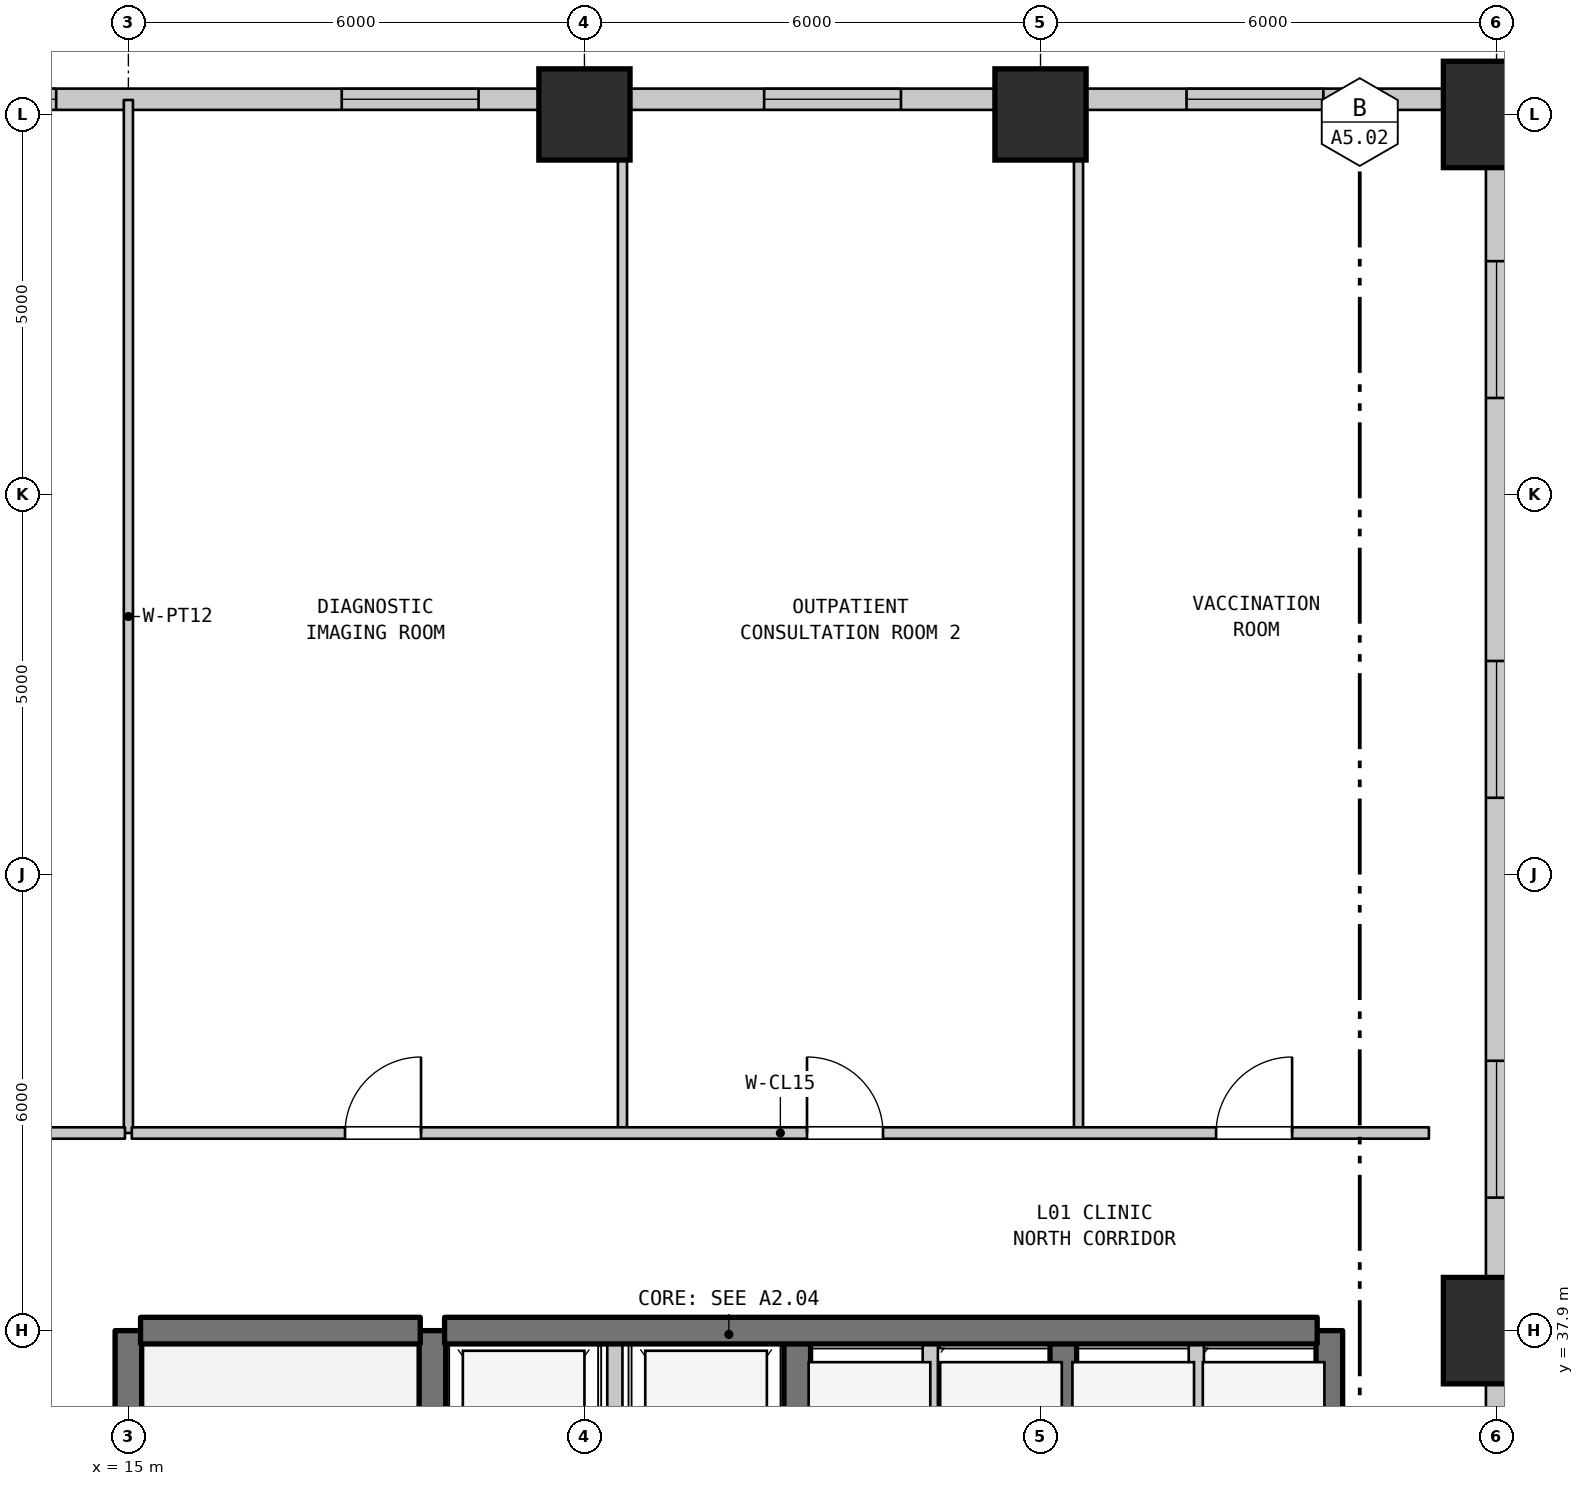
"""IFC4 building model, lengths in metres.
Left out: names, types, materials, properties, quantities, classifications, styles, units other than length and angle.
Written with IfcOpenShell. Run it as: python <this file> out.ifc"""

import sys

from ifc_helpers import new_model, si_unit, direction, frame, frame_2d, origin, origin_2d, place, context, subcontext, project, spatial, rectangle, extrude, element, fill, save


model = new_model("IFC4")
c1 = context("Model", 3, precision=1e-05, world=origin(), true_north=direction((0.0, 1.0)))
c2 = subcontext(c1, "Body", "Model", "MODEL_VIEW")
j1 = project(units=[si_unit("LENGTHUNIT", "METRE"), si_unit("PLANEANGLEUNIT", "RADIAN")], contexts=[c1])
p1 = place(None, origin())
s1 = spatial("IfcSite", under=j1, at=p1, CompositionType="ELEMENT")
p2 = place(p1, origin())
s2 = spatial("IfcBuilding", under=s1, at=p2, CompositionType="ELEMENT")
p3 = place(p2, frame((0.0, 0.0, 6.5)))
s3 = spatial("IfcBuildingStorey", under=s2, at=p3, CompositionType="ELEMENT", Elevation=6.5)
for number, where, z_axis, x_axis in (
    (1, (21.0, 53.9, 0.0), (0.0, 0.0, 1.0), (1.0, 0.0, 0.0)),
    (2, (27.0, 53.9, 0.0), (0.0, 0.0, 1.0), (1.0, 0.0, 0.0)),
):
    element("IfcColumn", number, at=place(p3, frame(where, z_axis=z_axis, x_axis=x_axis)), inside=s3, PredefinedType="PILASTER", context=c2, shape_type="SweptSolid", body=[
        extrude(rectangle(XDim=1.2, YDim=1.2, at=origin_2d()), origin(), (0.0, 0.0, 1.0), 6.5),
    ])
for number, where, z_axis, x_axis in (
    (3, (33.0, 37.9, 0.0), (0.0, 0.0, 1.0), (1.0, 0.0, 0.0)),
    (4, (33.0, 53.9, 0.0), (0.0, 0.0, 1.0), (1.0, 0.0, 0.0)),
):
    element("IfcColumn", number, at=place(p3, frame(where, z_axis=z_axis, x_axis=x_axis)), inside=s3, PredefinedType="PILASTER", context=c2, shape_type="SweptSolid", body=[
        extrude(rectangle(XDim=1.4, YDim=1.4, at=origin_2d()), origin(), (0.0, 0.0, 1.0), 6.5),
    ])
p4 = place(p3, frame((4.414, 54.1, 0.0), z_axis=(0.0, 0.0, 1.0), x_axis=(1.0, 0.0, 0.0)))
e5 = element("IfcWall", 5, at=p4, inside=s3, PredefinedType="STANDARD", context=c2, shape_type="SweptSolid", body=[
    extrude(rectangle(XDim=28.586, YDim=0.28, at=frame_2d((14.293, 0.0))), origin(), (0.0, 0.0, 1.0), 6.17),
])
p5 = place(p4, frame((2.279, 0.0, 0.95)))
e6 = element("IfcOpeningElement", 6, at=p5, cuts=e5, PredefinedType="OPENING", context=c2, shape_type="SweptSolid", body=[
    extrude(rectangle(XDim=1.8, YDim=1.8, at=frame_2d((0.9, 0.9))), frame((0.0, 0.15, 0.0), z_axis=(0.0, -1.0, 0.0), x_axis=(1.0, 0.0, 0.0)), (0.0, 0.0, 1.0), 0.3),
])
p6 = place(p4, frame((7.836, 0.0, 0.95)))
e7 = element("IfcOpeningElement", 7, at=p6, cuts=e5, PredefinedType="OPENING", context=c2, shape_type="SweptSolid", body=[
    extrude(rectangle(XDim=1.8, YDim=1.8, at=frame_2d((0.9, 0.9))), frame((0.0, 0.15, 0.0), z_axis=(0.0, -1.0, 0.0), x_axis=(1.0, 0.0, 0.0)), (0.0, 0.0, 1.0), 0.3),
])
p7 = place(p4, frame((13.393, 0.0, 0.95)))
e8 = element("IfcOpeningElement", 8, at=p7, cuts=e5, PredefinedType="OPENING", context=c2, shape_type="SweptSolid", body=[
    extrude(rectangle(XDim=1.8, YDim=1.8, at=frame_2d((0.9, 0.9))), frame((0.0, 0.15, 0.0), z_axis=(0.0, -1.0, 0.0), x_axis=(1.0, 0.0, 0.0)), (0.0, 0.0, 1.0), 0.3),
])
p8 = place(p4, frame((18.95, 0.0, 0.95)))
e9 = element("IfcOpeningElement", 9, at=p8, cuts=e5, PredefinedType="OPENING", context=c2, shape_type="SweptSolid", body=[
    extrude(rectangle(XDim=1.8, YDim=1.8, at=frame_2d((0.9, 0.9))), frame((0.0, 0.15, 0.0), z_axis=(0.0, -1.0, 0.0), x_axis=(1.0, 0.0, 0.0)), (0.0, 0.0, 1.0), 0.3),
])
p9 = place(p4, frame((24.507, 0.0, 0.95)))
e10 = element("IfcOpeningElement", 10, at=p9, cuts=e5, PredefinedType="OPENING", context=c2, shape_type="SweptSolid", body=[
    extrude(rectangle(XDim=1.8, YDim=1.8, at=frame_2d((0.9, 0.9))), frame((0.0, 0.15, 0.0), z_axis=(0.0, -1.0, 0.0), x_axis=(1.0, 0.0, 0.0)), (0.0, 0.0, 1.0), 0.3),
])
p10 = place(p3, frame((33.0, 54.1, 0.0), z_axis=(0.0, 0.0, 1.0), x_axis=(0.0, -1.0, 0.0)))
e11 = element("IfcWall", 11, at=p10, inside=s3, PredefinedType="STANDARD", context=c2, shape_type="SweptSolid", body=[
    extrude(rectangle(XDim=26.2, YDim=0.28, at=frame_2d((13.1, 0.0))), origin(), (0.0, 0.0, 1.0), 5.57),
])
p11 = place(p10, frame((2.13, 0.0, 0.95)))
e12 = element("IfcOpeningElement", 12, at=p11, cuts=e11, PredefinedType="OPENING", context=c2, shape_type="SweptSolid", body=[
    extrude(rectangle(XDim=1.8, YDim=1.8, at=frame_2d((0.9, 0.9))), frame((0.0, 0.15, 0.0), z_axis=(0.0, -1.0, 0.0), x_axis=(1.0, 0.0, 0.0)), (0.0, 0.0, 1.0), 0.3),
])
p12 = place(p10, frame((7.39, 0.0, 0.95)))
e13 = element("IfcOpeningElement", 13, at=p12, cuts=e11, PredefinedType="OPENING", context=c2, shape_type="SweptSolid", body=[
    extrude(rectangle(XDim=1.8, YDim=1.8, at=frame_2d((0.9, 0.9))), frame((0.0, 0.15, 0.0), z_axis=(0.0, -1.0, 0.0), x_axis=(1.0, 0.0, 0.0)), (0.0, 0.0, 1.0), 0.3),
])
p13 = place(p10, frame((12.65, 0.0, 0.95)))
e14 = element("IfcOpeningElement", 14, at=p13, cuts=e11, PredefinedType="OPENING", context=c2, shape_type="SweptSolid", body=[
    extrude(rectangle(XDim=1.8, YDim=1.8, at=frame_2d((0.9, 0.9))), frame((0.0, 0.15, 0.0), z_axis=(0.0, -1.0, 0.0), x_axis=(1.0, 0.0, 0.0)), (0.0, 0.0, 1.0), 0.3),
])
p14 = place(p10, frame((17.91, 0.0, 0.95)))
e15 = element("IfcOpeningElement", 15, at=p14, cuts=e11, PredefinedType="OPENING", context=c2, shape_type="SweptSolid", body=[
    extrude(rectangle(XDim=1.8, YDim=1.8, at=frame_2d((0.9, 0.9))), frame((0.0, 0.15, 0.0), z_axis=(0.0, -1.0, 0.0), x_axis=(1.0, 0.0, 0.0)), (0.0, 0.0, 1.0), 0.3),
])
p15 = place(p10, frame((23.17, 0.0, 0.95)))
e16 = element("IfcOpeningElement", 16, at=p15, cuts=e11, PredefinedType="OPENING", context=c2, shape_type="SweptSolid", body=[
    extrude(rectangle(XDim=1.8, YDim=1.8, at=frame_2d((0.9, 0.9))), frame((0.0, 0.15, 0.0), z_axis=(0.0, -1.0, 0.0), x_axis=(1.0, 0.0, 0.0)), (0.0, 0.0, 1.0), 0.3),
])
p16 = place(p3, frame((15.0, 31.1, 0.0), z_axis=(0.0, 0.0, 1.0), x_axis=(0.0, 1.0, 0.0)))
e17 = element("IfcWall", 17, at=p16, inside=s3, PredefinedType="SHEAR", context=c2, shape_type="SweptSolid", body=[
    extrude(rectangle(XDim=6.8, YDim=0.35, at=frame_2d((3.4, 0.0))), origin(), (0.0, 0.0, 1.0), 6.17),
])
p17 = place(p3, frame((15.0, 40.5, 0.0), z_axis=(0.0, 0.0, 1.0), x_axis=(0.0, 1.0, 0.0)))
e18 = element("IfcWall", 18, at=p17, inside=s3, PredefinedType="PARTITIONING", context=c2, shape_type="SweptSolid", body=[
    extrude(rectangle(XDim=13.59, YDim=0.12, at=frame_2d((6.795, 0.0))), origin(), (0.0, 0.0, 1.0), 6.17),
])
p18 = place(p3, frame((19.0, 35.0, 0.0), z_axis=(0.0, 0.0, 1.0), x_axis=(0.0, 1.0, 0.0)))
e19 = element("IfcWall", 19, at=p18, inside=s3, PredefinedType="SHEAR", context=c2, shape_type="SweptSolid", body=[
    extrude(rectangle(XDim=2.9, YDim=0.35, at=frame_2d((1.45, 0.0))), origin(), (0.0, 0.0, 1.0), 6.17),
])
p19 = place(p3, frame((21.4, 35.0, 0.0), z_axis=(0.0, 0.0, 1.0), x_axis=(0.0, 1.0, 0.0)))
e20 = element("IfcWall", 20, at=p19, inside=s3, PredefinedType="STANDARD", context=c2, shape_type="SweptSolid", body=[
    extrude(rectangle(XDim=2.9, YDim=0.2, at=frame_2d((1.45, 0.0))), origin(), (0.0, 0.0, 1.0), 6.17),
])
p20 = place(p3, frame((21.5, 40.5, 0.0), z_axis=(0.0, 0.0, 1.0), x_axis=(0.0, 1.0, 0.0)))
e21 = element("IfcWall", 21, at=p20, inside=s3, PredefinedType="PARTITIONING", context=c2, shape_type="SweptSolid", body=[
    extrude(rectangle(XDim=13.59, YDim=0.12, at=frame_2d((6.795, 0.0))), origin(), (0.0, 0.0, 1.0), 6.17),
])
p21 = place(p3, frame((23.8, 35.0, 0.0), z_axis=(0.0, 0.0, 1.0), x_axis=(0.0, 1.0, 0.0)))
e22 = element("IfcWall", 22, at=p21, inside=s3, PredefinedType="SHEAR", context=c2, shape_type="SweptSolid", body=[
    extrude(rectangle(XDim=2.9, YDim=0.35, at=frame_2d((1.45, 0.0))), origin(), (0.0, 0.0, 1.0), 6.17),
])
p22 = place(p3, frame((25.55, 35.0, 0.0), z_axis=(0.0, 0.0, 1.0), x_axis=(0.0, 1.0, 0.0)))
e23 = element("IfcWall", 23, at=p22, inside=s3, PredefinedType="STANDARD", context=c2, shape_type="SweptSolid", body=[
    extrude(rectangle(XDim=2.9, YDim=0.2, at=frame_2d((1.45, 0.0))), origin(), (0.0, 0.0, 1.0), 6.17),
])
p23 = place(p3, frame((27.3, 35.0, 0.0), z_axis=(0.0, 0.0, 1.0), x_axis=(0.0, 1.0, 0.0)))
e24 = element("IfcWall", 24, at=p23, inside=s3, PredefinedType="SHEAR", context=c2, shape_type="SweptSolid", body=[
    extrude(rectangle(XDim=2.9, YDim=0.35, at=frame_2d((1.45, 0.0))), origin(), (0.0, 0.0, 1.0), 6.17),
])
p24 = place(p3, frame((27.5, 40.5, 0.0), z_axis=(0.0, 0.0, 1.0), x_axis=(0.0, 1.0, 0.0)))
e25 = element("IfcWall", 25, at=p24, inside=s3, PredefinedType="PARTITIONING", context=c2, shape_type="SweptSolid", body=[
    extrude(rectangle(XDim=13.59, YDim=0.12, at=frame_2d((6.795, 0.0))), origin(), (0.0, 0.0, 1.0), 6.17),
])
p25 = place(p3, frame((29.05, 35.0, 0.0), z_axis=(0.0, 0.0, 1.0), x_axis=(0.0, 1.0, 0.0)))
e26 = element("IfcWall", 26, at=p25, inside=s3, PredefinedType="STANDARD", context=c2, shape_type="SweptSolid", body=[
    extrude(rectangle(XDim=2.9, YDim=0.2, at=frame_2d((1.45, 0.0))), origin(), (0.0, 0.0, 1.0), 6.17),
])
p26 = place(p3, frame((30.8, 35.0, 0.0), z_axis=(0.0, 0.0, 1.0), x_axis=(0.0, 1.0, 0.0)))
e27 = element("IfcWall", 27, at=p26, inside=s3, PredefinedType="SHEAR", context=c2, shape_type="SweptSolid", body=[
    extrude(rectangle(XDim=2.9, YDim=0.35, at=frame_2d((1.45, 0.0))), origin(), (0.0, 0.0, 1.0), 6.17),
])
p27 = place(p3, frame((15.16, 37.9, 0.0), z_axis=(0.0, 0.0, 1.0), x_axis=(1.0, 0.0, 0.0)))
e28 = element("IfcWall", 28, at=p27, inside=s3, PredefinedType="SHEAR", context=c2, shape_type="SweptSolid", body=[
    extrude(rectangle(XDim=3.68, YDim=0.35, at=frame_2d((1.84, 0.0))), origin(), (0.0, 0.0, 1.0), 6.17),
])
p28 = place(p3, frame((19.16, 37.9, 0.0), z_axis=(0.0, 0.0, 1.0), x_axis=(1.0, 0.0, 0.0)))
e29 = element("IfcWall", 29, at=p28, inside=s3, PredefinedType="SHEAR", context=c2, shape_type="SweptSolid", body=[
    extrude(rectangle(XDim=11.48, YDim=0.35, at=frame_2d((5.74, 0.0))), origin(), (0.0, 0.0, 1.0), 6.17),
])
p29 = place(p3, frame((12.26, 40.5, 0.0), z_axis=(0.0, 0.0, 1.0), x_axis=(1.0, 0.0, 0.0)))
e30 = element("IfcWall", 30, at=p29, inside=s3, PredefinedType="STANDARD", context=c2, shape_type="SweptSolid", body=[
    extrude(rectangle(XDim=2.695, YDim=0.15, at=frame_2d((1.348, 0.0))), origin(), (0.0, 0.0, 1.0), 6.17),
])
p30 = place(p3, frame((15.045, 40.5, 0.0), z_axis=(0.0, 0.0, 1.0), x_axis=(1.0, 0.0, 0.0)))
e31 = element("IfcWall", 31, at=p30, inside=s3, PredefinedType="STANDARD", context=c2, shape_type="SweptSolid", body=[
    extrude(rectangle(XDim=17.065, YDim=0.15, at=frame_2d((8.533, 0.0))), origin(), (0.0, 0.0, 1.0), 6.17),
])
p31 = place(p30, frame((2.805, 0.0, 0.0)))
e32 = element("IfcOpeningElement", 32, at=p31, cuts=e31, PredefinedType="OPENING", context=c2, shape_type="SweptSolid", body=[
    extrude(rectangle(XDim=1.0, YDim=2.15, at=frame_2d((0.5, 1.075))), frame((0.0, 0.085, 0.0), z_axis=(0.0, -1.0, 0.0), x_axis=(1.0, 0.0, 0.0)), (0.0, 0.0, 1.0), 0.17),
])
p32 = place(p30, frame((8.883, 0.0, 0.0)))
e33 = element("IfcOpeningElement", 33, at=p32, cuts=e31, PredefinedType="OPENING", context=c2, shape_type="SweptSolid", body=[
    extrude(rectangle(XDim=1.0, YDim=2.15, at=frame_2d((0.5, 1.075))), frame((0.0, 0.085, 0.0), z_axis=(0.0, -1.0, 0.0), x_axis=(1.0, 0.0, 0.0)), (0.0, 0.0, 1.0), 0.17),
])
p33 = place(p30, frame((14.265, 0.0, 0.0)))
e34 = element("IfcOpeningElement", 34, at=p33, cuts=e31, PredefinedType="OPENING", context=c2, shape_type="SweptSolid", body=[
    extrude(rectangle(XDim=1.0, YDim=2.15, at=frame_2d((0.5, 1.075))), frame((0.0, 0.085, 0.0), z_axis=(0.0, -1.0, 0.0), x_axis=(1.0, 0.0, 0.0)), (0.0, 0.0, 1.0), 0.17),
])
p34 = place(p6, origin())
e35 = element("IfcWindow", 35, at=p34, inside=s3, PartitioningType="DOUBLE_PANEL_VERTICAL", PredefinedType="WINDOW", context=c2, shape_type="SweptSolid", body=[
    extrude(rectangle(XDim=1.8, YDim=1.8, at=frame_2d((0.9, 0.9))), frame((0.0, 0.03, 0.0), z_axis=(0.0, -1.0, 0.0), x_axis=(1.0, 0.0, 0.0)), (0.0, 0.0, 1.0), 0.06),
])
fill(e7, e35)
p35 = place(p7, origin())
e36 = element("IfcWindow", 36, at=p35, inside=s3, PartitioningType="DOUBLE_PANEL_VERTICAL", PredefinedType="WINDOW", context=c2, shape_type="SweptSolid", body=[
    extrude(rectangle(XDim=1.8, YDim=1.8, at=frame_2d((0.9, 0.9))), frame((0.0, 0.03, 0.0), z_axis=(0.0, -1.0, 0.0), x_axis=(1.0, 0.0, 0.0)), (0.0, 0.0, 1.0), 0.06),
])
fill(e8, e36)
p36 = place(p8, origin())
e37 = element("IfcWindow", 37, at=p36, inside=s3, PartitioningType="DOUBLE_PANEL_VERTICAL", PredefinedType="WINDOW", context=c2, shape_type="SweptSolid", body=[
    extrude(rectangle(XDim=1.8, YDim=1.8, at=frame_2d((0.9, 0.9))), frame((0.0, 0.03, 0.0), z_axis=(0.0, -1.0, 0.0), x_axis=(1.0, 0.0, 0.0)), (0.0, 0.0, 1.0), 0.06),
])
fill(e9, e37)
p37 = place(p9, origin())
e38 = element("IfcWindow", 38, at=p37, inside=s3, PartitioningType="DOUBLE_PANEL_VERTICAL", PredefinedType="WINDOW", context=c2, shape_type="SweptSolid", body=[
    extrude(rectangle(XDim=1.8, YDim=1.8, at=frame_2d((0.9, 0.9))), frame((0.0, 0.03, 0.0), z_axis=(0.0, -1.0, 0.0), x_axis=(1.0, 0.0, 0.0)), (0.0, 0.0, 1.0), 0.06),
])
fill(e10, e38)
p38 = place(p11, origin())
e39 = element("IfcWindow", 39, at=p38, inside=s3, PartitioningType="DOUBLE_PANEL_VERTICAL", PredefinedType="WINDOW", context=c2, shape_type="SweptSolid", body=[
    extrude(rectangle(XDim=1.8, YDim=1.8, at=frame_2d((0.9, 0.9))), frame((0.0, 0.03, 0.0), z_axis=(0.0, -1.0, 0.0), x_axis=(1.0, 0.0, 0.0)), (0.0, 0.0, 1.0), 0.06),
])
fill(e12, e39)
p39 = place(p12, origin())
e40 = element("IfcWindow", 40, at=p39, inside=s3, PartitioningType="DOUBLE_PANEL_VERTICAL", PredefinedType="WINDOW", context=c2, shape_type="SweptSolid", body=[
    extrude(rectangle(XDim=1.8, YDim=1.8, at=frame_2d((0.9, 0.9))), frame((0.0, 0.03, 0.0), z_axis=(0.0, -1.0, 0.0), x_axis=(1.0, 0.0, 0.0)), (0.0, 0.0, 1.0), 0.06),
])
fill(e13, e40)
p40 = place(p13, origin())
e41 = element("IfcWindow", 41, at=p40, inside=s3, PartitioningType="DOUBLE_PANEL_VERTICAL", PredefinedType="WINDOW", context=c2, shape_type="SweptSolid", body=[
    extrude(rectangle(XDim=1.8, YDim=1.8, at=frame_2d((0.9, 0.9))), frame((0.0, 0.03, 0.0), z_axis=(0.0, -1.0, 0.0), x_axis=(1.0, 0.0, 0.0)), (0.0, 0.0, 1.0), 0.06),
])
fill(e14, e41)
p41 = place(p31, origin())
e42 = element("IfcDoor", 42, at=p41, inside=s3, OperationType="SINGLE_SWING_RIGHT", PredefinedType="DOOR", context=c2, shape_type="SweptSolid", body=[
    extrude(rectangle(XDim=1.0, YDim=2.15, at=frame_2d((0.5, 1.075))), frame((0.0, 0.025, 0.0), z_axis=(0.0, -1.0, 0.0), x_axis=(1.0, 0.0, 0.0)), (0.0, 0.0, 1.0), 0.05),
])
fill(e32, e42)
p42 = place(p32, origin())
e43 = element("IfcDoor", 43, at=p42, inside=s3, OperationType="SINGLE_SWING_LEFT", PredefinedType="DOOR", context=c2, shape_type="SweptSolid", body=[
    extrude(rectangle(XDim=1.0, YDim=2.15, at=frame_2d((0.5, 1.075))), frame((0.0, 0.025, 0.0), z_axis=(0.0, -1.0, 0.0), x_axis=(1.0, 0.0, 0.0)), (0.0, 0.0, 1.0), 0.05),
])
fill(e33, e43)
p43 = place(p33, origin())
e44 = element("IfcDoor", 44, at=p43, inside=s3, OperationType="SINGLE_SWING_RIGHT", PredefinedType="DOOR", context=c2, shape_type="SweptSolid", body=[
    extrude(rectangle(XDim=1.0, YDim=2.15, at=frame_2d((0.5, 1.075))), frame((0.0, 0.025, 0.0), z_axis=(0.0, -1.0, 0.0), x_axis=(1.0, 0.0, 0.0)), (0.0, 0.0, 1.0), 0.05),
])
fill(e34, e44)
save(model, sys.argv[1])
